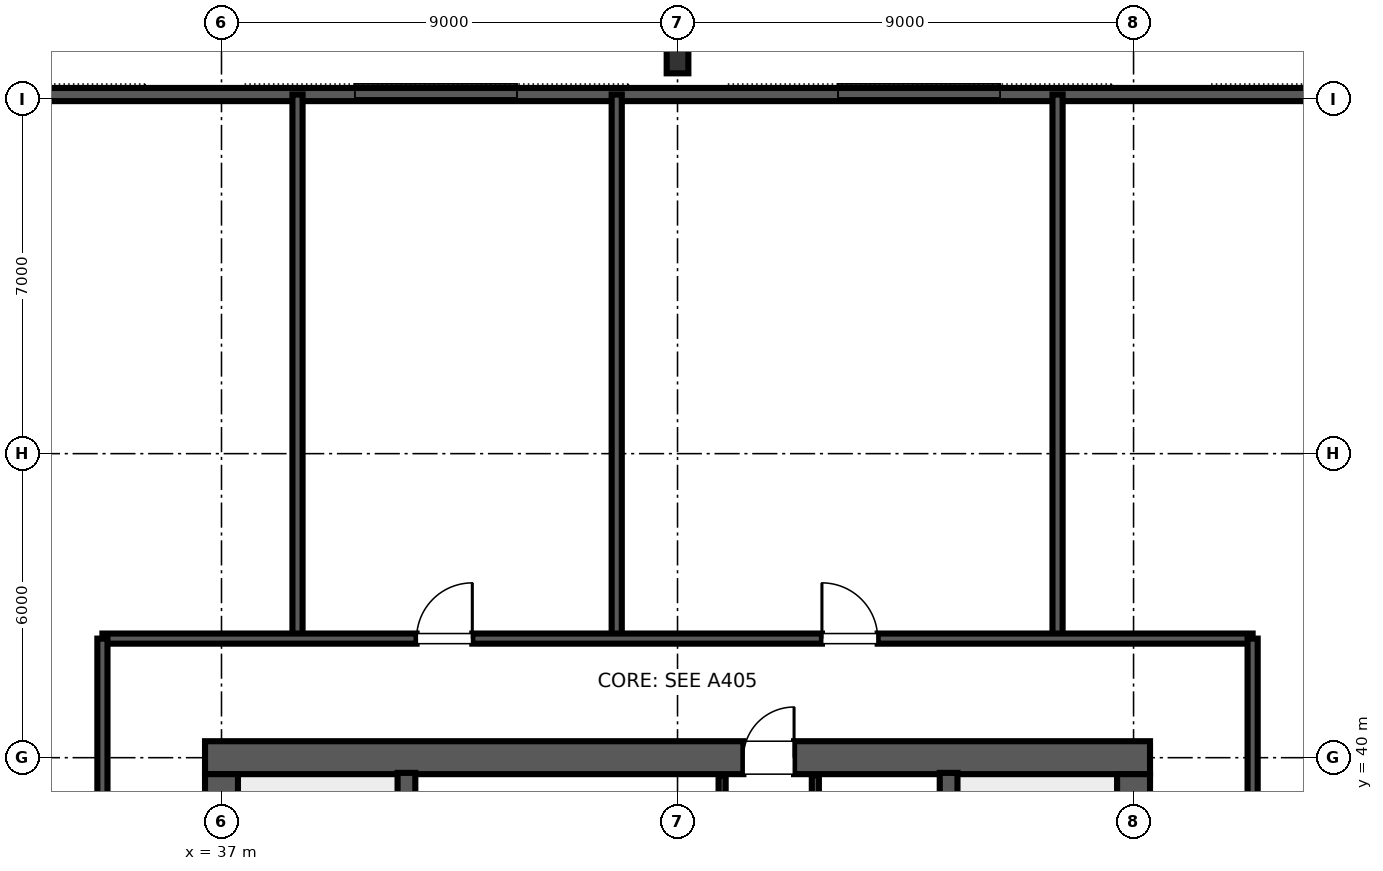
"""IFC4 building model, lengths in metres.
Left out: names, types, materials, properties, quantities, classifications, styles, units other than length and angle.
Written with IfcOpenShell. Run it as: python <this file> out.ifc"""

import sys

from ifc_helpers import new_model, si_unit, direction, frame, frame_2d, origin, origin_2d, place, context, subcontext, project, spatial, rectangle, i_section, extrude, element, fill, save


model = new_model("IFC4")
c1 = context("Model", 3, precision=1e-05, world=origin(), true_north=direction((0.0, 1.0)))
c2 = subcontext(c1, "Body", "Model", "MODEL_VIEW")
j1 = project(units=[si_unit("LENGTHUNIT", "METRE"), si_unit("PLANEANGLEUNIT", "RADIAN")], contexts=[c1])
p1 = place(None, origin())
s1 = spatial("IfcSite", under=j1, at=p1, CompositionType="ELEMENT")
p2 = place(p1, origin())
s2 = spatial("IfcBuilding", under=s1, at=p2, CompositionType="ELEMENT")
p3 = place(p2, frame((0.0, 0.0, 85.6)))
s3 = spatial("IfcBuildingStorey", under=s2, at=p3, CompositionType="ELEMENT", Elevation=85.6)
p4 = place(p3, frame((36.675, 40.0, 0.0), z_axis=(0.0, 0.0, 1.0), x_axis=(1.0, 0.0, 0.0)))
e1 = element("IfcWall", 1, at=p4, inside=s3, PredefinedType="SHEAR", context=c2, shape_type="SweptSolid", body=[
    extrude(rectangle(XDim=18.65, YDim=0.65, at=frame_2d((9.325, 0.0))), origin(), (0.0, 0.0, 1.0), 4.48),
])
p5 = place(p4, frame((10.625, 0.0, 0.0)))
e2 = element("IfcOpeningElement", 2, at=p5, cuts=e1, PredefinedType="OPENING", context=c2, shape_type="SweptSolid", body=[
    extrude(rectangle(XDim=1.0, YDim=2.15, at=frame_2d((0.5, 1.075))), frame((0.0, 0.335, 0.0), z_axis=(0.0, -1.0, 0.0), x_axis=(1.0, 0.0, 0.0)), (0.0, 0.0, 1.0), 0.67),
])
p6 = place(p3, frame((37.0, 24.325, 0.0), z_axis=(0.0, 0.0, 1.0), x_axis=(0.0, 1.0, 0.0)))
e3 = element("IfcWall", 3, at=p6, inside=s3, PredefinedType="SHEAR", context=c2, shape_type="SweptSolid", body=[
    extrude(rectangle(XDim=15.35, YDim=0.65, at=frame_2d((7.675, 0.0))), origin(), (0.0, 0.0, 1.0), 4.48),
])
p7 = place(p6, frame((5.2, 0.0, 0.0)))
e4 = element("IfcOpeningElement", 4, at=p7, cuts=e3, PredefinedType="OPENING", context=c2, shape_type="SweptSolid", body=[
    extrude(rectangle(XDim=1.15, YDim=2.15, at=frame_2d((0.575, 1.075))), frame((0.0, 0.335, 0.0), z_axis=(0.0, -1.0, 0.0), x_axis=(1.0, 0.0, 0.0)), (0.0, 0.0, 1.0), 0.67),
])
p8 = place(p3, frame((55.0, 24.325, 0.0), z_axis=(0.0, 0.0, 1.0), x_axis=(0.0, 1.0, 0.0)))
e5 = element("IfcWall", 5, at=p8, inside=s3, PredefinedType="SHEAR", context=c2, shape_type="SweptSolid", body=[
    extrude(rectangle(XDim=15.35, YDim=0.65, at=frame_2d((7.675, 0.0))), origin(), (0.0, 0.0, 1.0), 4.48),
])
p9 = place(p8, frame((5.2, 0.0, 0.0)))
e6 = element("IfcOpeningElement", 6, at=p9, cuts=e5, PredefinedType="OPENING", context=c2, shape_type="SweptSolid", body=[
    extrude(rectangle(XDim=1.15, YDim=2.15, at=frame_2d((0.575, 1.075))), frame((0.0, 0.335, 0.0), z_axis=(0.0, -1.0, 0.0), x_axis=(1.0, 0.0, 0.0)), (0.0, 0.0, 1.0), 0.67),
])
p10 = place(p3, frame((46.0, 53.747, 0.0), z_axis=(0.0, -0.04091223057, 0.999162744196), x_axis=(1.0, 0.0, 0.0)))
e7 = element("IfcColumn", 7, at=p10, inside=s3, PredefinedType="COLUMN", context=c2, shape_type="SweptSolid", body=[
    extrude(i_section(OverallWidth=0.428, OverallDepth=0.483, WebThickness=0.051, FlangeThickness=0.082, FilletRadius=0.025, at=origin_2d()), origin(), (0.0, 0.0, 1.0), 4.481),
])
p11 = place(p3, frame((65.973, 53.087, 0.0), z_axis=(0.0, 0.0, 1.0), x_axis=(-1.0, 0.0, 0.0)))
e8 = element("IfcWall", 8, at=p11, inside=s3, PredefinedType="STANDARD", context=c2, shape_type="SweptSolid", body=[
    extrude(rectangle(XDim=39.947, YDim=0.26, at=frame_2d((19.973, 0.0))), origin(), (0.0, 0.0, 1.0), 4.48),
])
for number, where, z_axis, x_axis in (
    (9, (40.65, 32.0, 0.0), (0.0, 0.0, 1.0), (0.0, 1.0, 0.0)),
    (10, (51.35, 32.0, 0.0), (0.0, 0.0, 1.0), (0.0, 1.0, 0.0)),
):
    element("IfcWall", number, at=place(p3, frame(where, z_axis=z_axis, x_axis=x_axis)), inside=s3, PredefinedType="SHEAR", context=c2, shape_type="SweptSolid", body=[
        extrude(rectangle(XDim=7.7, YDim=0.35, at=frame_2d((3.85, 0.0))), origin(), (0.0, 0.0, 1.0), 4.8),
    ])
p12 = place(p3, frame((46.88, 32.05, 0.0), z_axis=(0.0, 0.0, 1.0), x_axis=(0.0, 1.0, 0.0)))
e11 = element("IfcWall", 11, at=p12, inside=s3, PredefinedType="PARTITIONING", context=c2, shape_type="SweptSolid", body=[
    extrude(rectangle(XDim=7.6, YDim=0.14, at=frame_2d((3.8, 0.0))), origin(), (0.0, 0.0, 1.0), 4.48),
])
p13 = place(p12, frame((3.4, 0.0, 0.0)))
e12 = element("IfcOpeningElement", 12, at=p13, cuts=e11, PredefinedType="OPENING", context=c2, shape_type="SweptSolid", body=[
    extrude(rectangle(XDim=0.95, YDim=2.15, at=frame_2d((0.475, 1.075))), frame((0.0, 0.08, 0.0), z_axis=(0.0, -1.0, 0.0), x_axis=(1.0, 0.0, 0.0)), (0.0, 0.0, 1.0), 0.16),
])
p14 = place(p3, frame((48.72, 32.05, 0.0), z_axis=(0.0, 0.0, 1.0), x_axis=(0.0, 1.0, 0.0)))
e13 = element("IfcWall", 13, at=p14, inside=s3, PredefinedType="PARTITIONING", context=c2, shape_type="SweptSolid", body=[
    extrude(rectangle(XDim=7.6, YDim=0.14, at=frame_2d((3.8, 0.0))), origin(), (0.0, 0.0, 1.0), 4.48),
])
p15 = place(p14, frame((0.8, 0.0, 0.0)))
e14 = element("IfcOpeningElement", 14, at=p15, cuts=e13, PredefinedType="OPENING", context=c2, shape_type="SweptSolid", body=[
    extrude(rectangle(XDim=0.9, YDim=2.15, at=frame_2d((0.45, 1.075))), frame((0.0, 0.08, 0.0), z_axis=(0.0, -1.0, 0.0), x_axis=(1.0, 0.0, 0.0)), (0.0, 0.0, 1.0), 0.16),
])
p16 = place(p14, frame((3.35, 0.0, 0.0)))
e15 = element("IfcOpeningElement", 15, at=p16, cuts=e13, PredefinedType="OPENING", context=c2, shape_type="SweptSolid", body=[
    extrude(rectangle(XDim=0.9, YDim=2.15, at=frame_2d((0.45, 1.075))), frame((0.0, 0.08, 0.0), z_axis=(0.0, -1.0, 0.0), x_axis=(1.0, 0.0, 0.0)), (0.0, 0.0, 1.0), 0.16),
])
p17 = place(p14, frame((5.9, 0.0, 0.0)))
e16 = element("IfcOpeningElement", 16, at=p17, cuts=e13, PredefinedType="OPENING", context=c2, shape_type="SweptSolid", body=[
    extrude(rectangle(XDim=0.92, YDim=2.15, at=frame_2d((0.46, 1.075))), frame((0.0, 0.08, 0.0), z_axis=(0.0, -1.0, 0.0), x_axis=(1.0, 0.0, 0.0)), (0.0, 0.0, 1.0), 0.16),
])
for number, where, z_axis, x_axis in (
    (17, (44.8, 42.35, 0.0), (0.0, 0.0, 1.0), (0.0, 1.0, 0.0)),
    (18, (38.5, 42.35, 0.0), (0.0, 0.0, 1.0), (0.0, 1.0, 0.0)),
    (19, (53.5, 42.35, 0.0), (0.0, 0.0, 1.0), (0.0, 1.0, 0.0)),
):
    element("IfcWall", number, at=place(p3, frame(where, z_axis=z_axis, x_axis=x_axis)), inside=s3, PredefinedType="PARTITIONING", context=c2, shape_type="SweptSolid", body=[
        extrude(rectangle(XDim=10.737, YDim=0.2, at=frame_2d((5.368, 0.0))), origin(), (0.0, 0.0, 1.0), 4.48),
    ])
p18 = place(p3, frame((34.65, 42.35, 0.0), z_axis=(0.0, 0.0, 1.0), x_axis=(1.0, 0.0, 0.0)))
e20 = element("IfcWall", 20, at=p18, inside=s3, PredefinedType="PARTITIONING", context=c2, shape_type="SweptSolid", body=[
    extrude(rectangle(XDim=22.7, YDim=0.2, at=frame_2d((11.35, 0.0))), origin(), (0.0, 0.0, 1.0), 3.41),
])
p19 = place(p18, frame((6.2, 0.0, 0.0)))
e21 = element("IfcOpeningElement", 21, at=p19, cuts=e20, PredefinedType="OPENING", context=c2, shape_type="SweptSolid", body=[
    extrude(rectangle(XDim=1.1, YDim=2.15, at=frame_2d((0.55, 1.075))), frame((0.0, 0.11, 0.0), z_axis=(0.0, -1.0, 0.0), x_axis=(1.0, 0.0, 0.0)), (0.0, 0.0, 1.0), 0.22),
])
p20 = place(p18, frame((14.2, 0.0, 0.0)))
e22 = element("IfcOpeningElement", 22, at=p20, cuts=e20, PredefinedType="OPENING", context=c2, shape_type="SweptSolid", body=[
    extrude(rectangle(XDim=1.1, YDim=2.15, at=frame_2d((0.55, 1.075))), frame((0.0, 0.11, 0.0), z_axis=(0.0, -1.0, 0.0), x_axis=(1.0, 0.0, 0.0)), (0.0, 0.0, 1.0), 0.22),
])
p21 = place(p3, frame((34.65, 21.65, 0.0), z_axis=(0.0, 0.0, 1.0), x_axis=(0.0, 1.0, 0.0)))
e23 = element("IfcWall", 23, at=p21, inside=s3, PredefinedType="PARTITIONING", context=c2, shape_type="SweptSolid", body=[
    extrude(rectangle(XDim=20.7, YDim=0.2, at=frame_2d((10.35, 0.0))), origin(), (0.0, 0.0, 1.0), 3.41),
])
p22 = place(p21, frame((9.6, 0.0, 0.0)))
e24 = element("IfcOpeningElement", 24, at=p22, cuts=e23, PredefinedType="OPENING", context=c2, shape_type="SweptSolid", body=[
    extrude(rectangle(XDim=1.6, YDim=2.15, at=frame_2d((0.8, 1.075))), frame((0.0, 0.11, 0.0), z_axis=(0.0, -1.0, 0.0), x_axis=(1.0, 0.0, 0.0)), (0.0, 0.0, 1.0), 0.22),
])
p23 = place(p3, frame((57.35, 21.65, 0.0), z_axis=(0.0, 0.0, 1.0), x_axis=(0.0, 1.0, 0.0)))
e25 = element("IfcWall", 25, at=p23, inside=s3, PredefinedType="PARTITIONING", context=c2, shape_type="SweptSolid", body=[
    extrude(rectangle(XDim=20.7, YDim=0.2, at=frame_2d((10.35, 0.0))), origin(), (0.0, 0.0, 1.0), 3.41),
])
p24 = place(p23, frame((9.6, 0.0, 0.0)))
e26 = element("IfcOpeningElement", 26, at=p24, cuts=e25, PredefinedType="OPENING", context=c2, shape_type="SweptSolid", body=[
    extrude(rectangle(XDim=1.6, YDim=2.15, at=frame_2d((0.8, 1.075))), frame((0.0, 0.11, 0.0), z_axis=(0.0, -1.0, 0.0), x_axis=(1.0, 0.0, 0.0)), (0.0, 0.0, 1.0), 0.22),
])
p25 = place(p5, origin())
e27 = element("IfcDoor", 27, at=p25, inside=s3, OperationType="SINGLE_SWING_RIGHT", PredefinedType="DOOR", context=c2, shape_type="SweptSolid", body=[
    extrude(rectangle(XDim=1.0, YDim=2.15, at=frame_2d((0.5, 1.075))), frame((0.0, 0.025, 0.0), z_axis=(0.0, -1.0, 0.0), x_axis=(1.0, 0.0, 0.0)), (0.0, 0.0, 1.0), 0.05),
])
fill(e2, e27)
p26 = place(p19, origin())
e28 = element("IfcDoor", 28, at=p26, inside=s3, OperationType="SINGLE_SWING_RIGHT", PredefinedType="DOOR", context=c2, shape_type="SweptSolid", body=[
    extrude(rectangle(XDim=1.1, YDim=2.15, at=frame_2d((0.55, 1.075))), frame((0.0, 0.025, 0.0), z_axis=(0.0, -1.0, 0.0), x_axis=(1.0, 0.0, 0.0)), (0.0, 0.0, 1.0), 0.05),
])
fill(e21, e28)
p27 = place(p20, origin())
e29 = element("IfcDoor", 29, at=p27, inside=s3, OperationType="SINGLE_SWING_LEFT", PredefinedType="DOOR", context=c2, shape_type="SweptSolid", body=[
    extrude(rectangle(XDim=1.1, YDim=2.15, at=frame_2d((0.55, 1.075))), frame((0.0, 0.025, 0.0), z_axis=(0.0, -1.0, 0.0), x_axis=(1.0, 0.0, 0.0)), (0.0, 0.0, 1.0), 0.05),
])
fill(e22, e29)
save(model, sys.argv[1])
